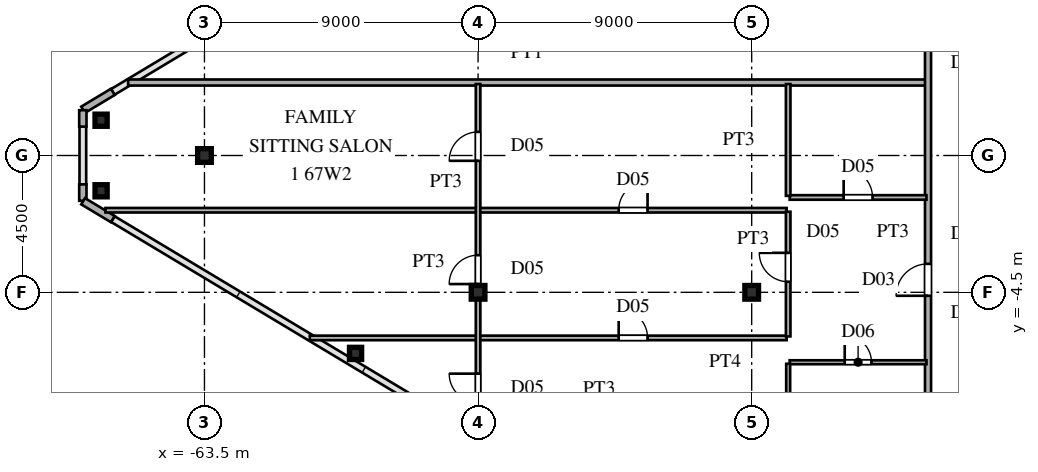
"""IFC4 building model, lengths in metres.
Left out: names, types, materials, properties, quantities, classifications, styles, units other than length and angle.
Written with IfcOpenShell. Run it as: python <this file> out.ifc"""

import sys

from ifc_helpers import new_model, si_unit, direction, frame, frame_2d, origin, origin_2d, place, context, subcontext, project, spatial, rectangle, hollow_rectangle, i_section, extrude, source, transform, mapped, element, fill, save


model = new_model("IFC4")
c1 = context("Model", 3, precision=1e-05, world=origin(), true_north=direction((0.0, 1.0)))
c2 = subcontext(c1, "Body", "Model", "MODEL_VIEW")
j1 = project(units=[si_unit("LENGTHUNIT", "METRE"), si_unit("PLANEANGLEUNIT", "RADIAN")], contexts=[c1])
p1 = place(None, origin())
s1 = spatial("IfcSite", under=j1, at=p1, CompositionType="ELEMENT")
p2 = place(p1, origin())
s2 = spatial("IfcBuilding", under=s1, at=p2, CompositionType="ELEMENT")
p3 = place(p2, frame((0.0, 0.0, 254.4)))
s3 = spatial("IfcBuildingStorey", under=s2, at=p3, CompositionType="ELEMENT", Elevation=254.4)
m1 = source(origin(), c2, "Body", "SweptSolid", [
    extrude(i_section(OverallWidth=0.45, OverallDepth=0.45, WebThickness=0.016, FlangeThickness=0.025, at=origin_2d()), origin(), (0.0, 0.0, 1.0), 3.75),
])
for number, where, z_axis, x_axis in (
    (1, (-45.5, -4.5, 0.0), (0.0, 0.0, 1.0), (1.0, 0.0, 0.0)),
    (2, (-54.5, -4.5, 0.0), (0.0, 0.0, 1.0), (1.0, 0.0, 0.0)),
    (3, (-63.5, 0.0, 0.0), (0.0, 0.0, 1.0), (1.0, 0.0, 0.0)),
):
    element("IfcColumn", number, at=place(p3, frame(where, z_axis=z_axis, x_axis=x_axis)), inside=s3, PredefinedType="COLUMN", context=c2, shape_type="MappedRepresentation", body=[
        mapped(m1, transform((0.0, 0.0, 0.0), scale=1.0)),
    ])
m2 = source(origin(), c2, "Body", "SweptSolid", [
    extrude(hollow_rectangle(XDim=0.4, YDim=0.4, WallThickness=0.016, at=origin_2d()), origin(), (0.0, 0.0, 1.0), 3.75),
])
for number, where, z_axis, x_axis in (
    (4, (-66.9, 1.16, 0.0), (0.0, 0.0, 1.0), (1.0, 0.0, 0.0)),
    (5, (-66.9, -1.16, 0.0), (0.0, 0.0, 1.0), (1.0, 0.0, 0.0)),
    (6, (-58.53, -6.509, 0.0), (0.0, 0.0, 1.0), (1.0, 0.0, 0.0)),
):
    element("IfcColumn", number, at=place(p3, frame(where, z_axis=z_axis, x_axis=x_axis)), inside=s3, PredefinedType="COLUMN", context=c2, shape_type="MappedRepresentation", body=[
        mapped(m2, transform((0.0, 0.0, 0.0), scale=1.0)),
    ])
p4 = place(p3, frame((-66.514, 2.092, 0.0), z_axis=(0.0, 0.0, 1.0), x_axis=(-0.85743623509, -0.514590228002, 0.0)))
e7 = element("IfcWall", 7, at=p4, inside=s3, PredefinedType="SOLIDWALL", context=c2, shape_type="SweptSolid", body=[
    extrude(rectangle(XDim=1.14, YDim=0.24, at=frame_2d((0.57, 0.0))), origin(), (0.0, 0.0, 1.0), 3.53),
])
for number, where, z_axis, x_axis in (
    (8, (-67.5, 1.49, 0.0), (0.0, 0.0, 1.0), (0.0, -1.0, 0.0)),
    (9, (-67.5, -0.95, 0.0), (0.0, 0.0, 1.0), (0.0, -1.0, 0.0)),
):
    element("IfcWall", number, at=place(p3, frame(where, z_axis=z_axis, x_axis=x_axis)), inside=s3, PredefinedType="SOLIDWALL", context=c2, shape_type="SweptSolid", body=[
        extrude(rectangle(XDim=0.54, YDim=0.24, at=frame_2d((0.27, 0.0))), origin(), (0.0, 0.0, 1.0), 3.53),
    ])
p5 = place(p3, frame((-67.491, -1.505, 0.0), z_axis=(0.0, 0.0, 1.0), x_axis=(0.85743623509, -0.514590228002, 0.0)))
e10 = element("IfcWall", 10, at=p5, inside=s3, PredefinedType="SOLIDWALL", context=c2, shape_type="SweptSolid", body=[
    extrude(rectangle(XDim=1.14, YDim=0.24, at=frame_2d((0.57, 0.0))), origin(), (0.0, 0.0, 1.0), 3.53),
])
p6 = place(p3, frame((-44.25, -6.8, 0.0), z_axis=(0.0, 0.0, 1.0), x_axis=(1.0, 0.0, 0.0)))
e11 = element("IfcWall", 11, at=p6, inside=s3, PredefinedType="PARTITIONING", context=c2, shape_type="SweptSolid", body=[
    extrude(rectangle(XDim=4.5, YDim=0.13, at=frame_2d((2.25, 0.0))), origin(), (0.0, 0.0, 1.0), 3.53),
])
p7 = place(p6, frame((1.81, 0.0, 0.0)))
e12 = element("IfcOpeningElement", 12, at=p7, cuts=e11, PredefinedType="OPENING", context=c2, shape_type="SweptSolid", body=[
    extrude(rectangle(XDim=0.88, YDim=2.1, at=frame_2d((0.44, 1.05))), frame((0.0, 0.075, 0.0), z_axis=(0.0, -1.0, 0.0), x_axis=(1.0, 0.0, 0.0)), (0.0, 0.0, 1.0), 0.15),
])
p8 = place(p3, frame((-60.035, -6.0, 0.0), z_axis=(0.0, 0.0, 1.0), x_axis=(1.0, 0.0, 0.0)))
e13 = element("IfcWall", 13, at=p8, inside=s3, PredefinedType="PARTITIONING", context=c2, shape_type="SweptSolid", body=[
    extrude(rectangle(XDim=15.685, YDim=0.15, at=frame_2d((7.842, 0.0))), origin(), (0.0, 0.0, 1.0), 3.53),
])
p9 = place(p8, frame((10.16, 0.0, 0.0)))
e14 = element("IfcOpeningElement", 14, at=p9, cuts=e13, PredefinedType="OPENING", context=c2, shape_type="SweptSolid", body=[
    extrude(rectangle(XDim=0.95, YDim=2.15, at=frame_2d((0.475, 1.075))), frame((0.0, 0.085, 0.0), z_axis=(0.0, -1.0, 0.0), x_axis=(1.0, 0.0, 0.0)), (0.0, 0.0, 1.0), 0.17),
])
p10 = place(p3, frame((-66.757, -1.8, 0.0), z_axis=(0.0, 0.0, 1.0), x_axis=(1.0, 0.0, 0.0)))
e15 = element("IfcWall", 15, at=p10, inside=s3, PredefinedType="PARTITIONING", context=c2, shape_type="SweptSolid", body=[
    extrude(rectangle(XDim=22.407, YDim=0.15, at=frame_2d((11.204, 0.0))), origin(), (0.0, 0.0, 1.0), 3.53),
])
p11 = place(p10, frame((16.882, 0.0, 0.0)))
e16 = element("IfcOpeningElement", 16, at=p11, cuts=e15, PredefinedType="OPENING", context=c2, shape_type="SweptSolid", body=[
    extrude(rectangle(XDim=0.95, YDim=2.15, at=frame_2d((0.475, 1.075))), frame((0.0, 0.085, 0.0), z_axis=(0.0, -1.0, 0.0), x_axis=(1.0, 0.0, 0.0)), (0.0, 0.0, 1.0), 0.17),
])
p12 = place(p3, frame((-44.25, -1.38, 0.0), z_axis=(0.0, 0.0, 1.0), x_axis=(1.0, 0.0, 0.0)))
e17 = element("IfcWall", 17, at=p12, inside=s3, PredefinedType="PARTITIONING", context=c2, shape_type="SweptSolid", body=[
    extrude(rectangle(XDim=4.5, YDim=0.15, at=frame_2d((2.25, 0.0))), origin(), (0.0, 0.0, 1.0), 3.53),
])
p13 = place(p12, frame((1.775, 0.0, 0.0)))
e18 = element("IfcOpeningElement", 18, at=p13, cuts=e17, PredefinedType="OPENING", context=c2, shape_type="SweptSolid", body=[
    extrude(rectangle(XDim=0.95, YDim=2.15, at=frame_2d((0.475, 1.075))), frame((0.0, 0.085, 0.0), z_axis=(0.0, -1.0, 0.0), x_axis=(1.0, 0.0, 0.0)), (0.0, 0.0, 1.0), 0.17),
])
p14 = place(p3, frame((-66.01, 2.4, 0.0), z_axis=(0.0, 0.0, 1.0), x_axis=(1.0, 0.0, 0.0)))
e19 = element("IfcWall", 19, at=p14, inside=s3, PredefinedType="PARTITIONING", context=c2, shape_type="SweptSolid", body=[
    extrude(rectangle(XDim=26.23, YDim=0.2, at=frame_2d((13.115, 0.0))), origin(), (0.0, 0.0, 1.0), 3.53),
])
p15 = place(p3, frame((-54.5, -9.335, 0.0), z_axis=(0.0, 0.0, 1.0), x_axis=(0.0, 1.0, 0.0)))
e20 = element("IfcWall", 20, at=p15, inside=s3, PredefinedType="PARTITIONING", context=c2, shape_type="SweptSolid", body=[
    extrude(rectangle(XDim=11.685, YDim=0.15, at=frame_2d((5.843, 0.0))), origin(), (0.0, 0.0, 1.0), 2.93),
])
p16 = place(p15, frame((5.107, 0.0, 0.0)))
e21 = element("IfcOpeningElement", 21, at=p16, cuts=e20, PredefinedType="OPENING", context=c2, shape_type="SweptSolid", body=[
    extrude(rectangle(XDim=0.95, YDim=2.15, at=frame_2d((0.475, 1.075))), frame((0.0, 0.085, 0.0), z_axis=(0.0, -1.0, 0.0), x_axis=(1.0, 0.0, 0.0)), (0.0, 0.0, 1.0), 0.17),
])
p17 = place(p15, frame((1.21, 0.0, 0.0)))
e22 = element("IfcOpeningElement", 22, at=p17, cuts=e20, PredefinedType="OPENING", context=c2, shape_type="SweptSolid", body=[
    extrude(rectangle(XDim=0.95, YDim=2.15, at=frame_2d((0.475, 1.075))), frame((0.0, 0.085, 0.0), z_axis=(0.0, -1.0, 0.0), x_axis=(1.0, 0.0, 0.0)), (0.0, 0.0, 1.0), 0.17),
])
p18 = place(p15, frame((9.16, 0.0, 0.0)))
e23 = element("IfcOpeningElement", 23, at=p18, cuts=e20, PredefinedType="OPENING", context=c2, shape_type="SweptSolid", body=[
    extrude(rectangle(XDim=0.95, YDim=2.15, at=frame_2d((0.475, 1.075))), frame((0.0, 0.085, 0.0), z_axis=(0.0, -1.0, 0.0), x_axis=(1.0, 0.0, 0.0)), (0.0, 0.0, 1.0), 0.17),
])
p19 = place(p3, frame((-44.3, -10.15, 0.0), z_axis=(0.0, 0.0, 1.0), x_axis=(0.0, 1.0, 0.0)))
e24 = element("IfcWall", 24, at=p19, inside=s3, PredefinedType="PARTITIONING", context=c2, shape_type="SweptSolid", body=[
    extrude(rectangle(XDim=3.3, YDim=0.13, at=frame_2d((1.65, 0.0))), origin(), (0.0, 0.0, 1.0), 3.53),
])
p20 = place(p3, frame((-44.3, -5.95, 0.0), z_axis=(0.0, 0.0, 1.0), x_axis=(0.0, 1.0, 0.0)))
e25 = element("IfcWall", 25, at=p20, inside=s3, PredefinedType="PARTITIONING", context=c2, shape_type="SweptSolid", body=[
    extrude(rectangle(XDim=4.1, YDim=0.15, at=frame_2d((2.05, 0.0))), origin(), (0.0, 0.0, 1.0), 3.53),
])
p21 = place(p20, frame((1.798, 0.0, 0.0)))
e26 = element("IfcOpeningElement", 26, at=p21, cuts=e25, PredefinedType="OPENING", context=c2, shape_type="SweptSolid", body=[
    extrude(rectangle(XDim=0.95, YDim=2.15, at=frame_2d((0.475, 1.075))), frame((0.0, 0.085, 0.0), z_axis=(0.0, -1.0, 0.0), x_axis=(1.0, 0.0, 0.0)), (0.0, 0.0, 1.0), 0.17),
])
p22 = place(p3, frame((-44.3, -1.328, 0.0), z_axis=(0.0, 0.0, 1.0), x_axis=(0.0, 1.0, 0.0)))
e27 = element("IfcWall", 27, at=p22, inside=s3, PredefinedType="PARTITIONING", context=c2, shape_type="SweptSolid", body=[
    extrude(rectangle(XDim=3.678, YDim=0.15, at=frame_2d((1.839, 0.0))), origin(), (0.0, 0.0, 1.0), 3.53),
])
p23 = place(p3, frame((-39.7, -15.515, 0.0), z_axis=(0.0, 0.0, 1.0), x_axis=(0.0, 1.0, 0.0)))
e28 = element("IfcWall", 28, at=p23, inside=s3, PredefinedType="PARTITIONING", context=c2, shape_type="SweptSolid", body=[
    extrude(rectangle(XDim=31.03, YDim=0.2, at=frame_2d((15.515, 0.0))), origin(), (0.0, 0.0, 1.0), 3.53),
])
p24 = place(p23, frame((2.09, 0.0, 0.0)))
e29 = element("IfcOpeningElement", 29, at=p24, cuts=e28, PredefinedType="OPENING", context=c2, shape_type="SweptSolid", body=[
    extrude(rectangle(XDim=1.05, YDim=2.25, at=frame_2d((0.525, 1.125))), frame((0.0, 0.11, 0.0), z_axis=(0.0, -1.0, 0.0), x_axis=(1.0, 0.0, 0.0)), (0.0, 0.0, 1.0), 0.22),
])
p25 = place(p23, frame((10.901, 0.0, 0.0)))
e30 = element("IfcOpeningElement", 30, at=p25, cuts=e28, PredefinedType="OPENING", context=c2, shape_type="SweptSolid", body=[
    extrude(rectangle(XDim=1.05, YDim=2.25, at=frame_2d((0.525, 1.125))), frame((0.0, 0.11, 0.0), z_axis=(0.0, -1.0, 0.0), x_axis=(1.0, 0.0, 0.0)), (0.0, 0.0, 1.0), 0.22),
])
p26 = place(p23, frame((23.99, 0.0, 0.0)))
e31 = element("IfcOpeningElement", 31, at=p26, cuts=e28, PredefinedType="OPENING", context=c2, shape_type="SweptSolid", body=[
    extrude(rectangle(XDim=1.05, YDim=2.25, at=frame_2d((0.525, 1.125))), frame((0.0, 0.11, 0.0), z_axis=(0.0, -1.0, 0.0), x_axis=(1.0, 0.0, 0.0)), (0.0, 0.0, 1.0), 0.22),
])
m3 = source(origin(), c2, "Body", "SweptSolid", [
    extrude(rectangle(XDim=0.88, YDim=2.1, at=frame_2d((0.44, 1.05))), frame((0.0, 0.025, 0.0), z_axis=(0.0, -1.0, 0.0), x_axis=(1.0, 0.0, 0.0)), (0.0, 0.0, 1.0), 0.05),
])
p27 = place(p7, origin())
e32 = element("IfcDoor", 32, at=p27, inside=s3, OperationType="SINGLE_SWING_LEFT", PredefinedType="DOOR", context=c2, shape_type="MappedRepresentation", body=[
    mapped(m3, transform((0.0, 0.0, 0.0), scale=1.0)),
])
fill(e12, e32)
m4 = source(origin(), c2, "Body", "SweptSolid", [
    extrude(rectangle(XDim=0.95, YDim=2.15, at=frame_2d((0.475, 1.075))), frame((0.0, 0.025, 0.0), z_axis=(0.0, -1.0, 0.0), x_axis=(1.0, 0.0, 0.0)), (0.0, 0.0, 1.0), 0.05),
])
p28 = place(p9, origin())
e33 = element("IfcDoor", 33, at=p28, inside=s3, OperationType="SINGLE_SWING_LEFT", PredefinedType="DOOR", context=c2, shape_type="MappedRepresentation", body=[
    mapped(m4, transform((0.0, 0.0, 0.0), scale=1.0)),
])
fill(e14, e33)
p29 = place(p11, origin())
e34 = element("IfcDoor", 34, at=p29, inside=s3, OperationType="SINGLE_SWING_RIGHT", PredefinedType="DOOR", context=c2, shape_type="MappedRepresentation", body=[
    mapped(m4, transform((0.0, 0.0, 0.0), scale=1.0)),
])
fill(e16, e34)
p30 = place(p13, origin())
e35 = element("IfcDoor", 35, at=p30, inside=s3, OperationType="SINGLE_SWING_LEFT", PredefinedType="DOOR", context=c2, shape_type="MappedRepresentation", body=[
    mapped(m4, transform((0.0, 0.0, 0.0), scale=1.0)),
])
fill(e18, e35)
p31 = place(p16, origin())
e36 = element("IfcDoor", 36, at=p31, inside=s3, OperationType="SINGLE_SWING_LEFT", PredefinedType="DOOR", context=c2, shape_type="MappedRepresentation", body=[
    mapped(m4, transform((0.0, 0.0, 0.0), scale=1.0)),
])
fill(e21, e36)
p32 = place(p17, origin())
e37 = element("IfcDoor", 37, at=p32, inside=s3, OperationType="SINGLE_SWING_RIGHT", PredefinedType="DOOR", context=c2, shape_type="MappedRepresentation", body=[
    mapped(m4, transform((0.0, 0.0, 0.0), scale=1.0)),
])
fill(e22, e37)
p33 = place(p18, origin())
e38 = element("IfcDoor", 38, at=p33, inside=s3, OperationType="SINGLE_SWING_LEFT", PredefinedType="DOOR", context=c2, shape_type="MappedRepresentation", body=[
    mapped(m4, transform((0.0, 0.0, 0.0), scale=1.0)),
])
fill(e23, e38)
p34 = place(p21, origin())
e39 = element("IfcDoor", 39, at=p34, inside=s3, OperationType="SINGLE_SWING_RIGHT", PredefinedType="DOOR", context=c2, shape_type="MappedRepresentation", body=[
    mapped(m4, transform((0.0, 0.0, 0.0), scale=1.0)),
])
fill(e26, e39)
m5 = source(origin(), c2, "Body", "SweptSolid", [
    extrude(rectangle(XDim=1.05, YDim=2.25, at=frame_2d((0.525, 1.125))), frame((0.0, 0.025, 0.0), z_axis=(0.0, -1.0, 0.0), x_axis=(1.0, 0.0, 0.0)), (0.0, 0.0, 1.0), 0.05),
])
p35 = place(p25, origin())
e40 = element("IfcDoor", 40, at=p35, inside=s3, OperationType="SINGLE_SWING_LEFT", PredefinedType="DOOR", context=c2, shape_type="MappedRepresentation", body=[
    mapped(m5, transform((0.0, 0.0, 0.0), scale=1.0)),
])
fill(e30, e40)
save(model, sys.argv[1])
